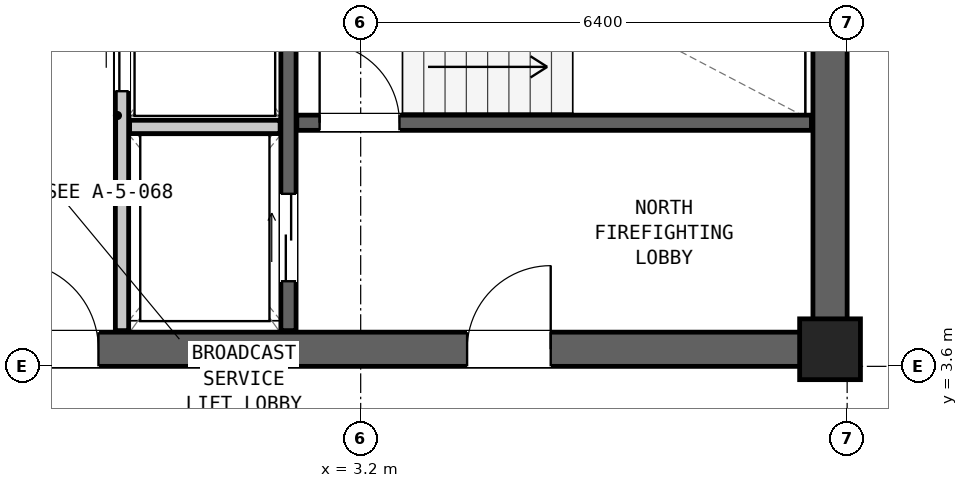
"""IFC4 building model, lengths in metres.
Left out: names, types, materials, properties, quantities, classifications, styles, units other than length and angle.
Written with IfcOpenShell. Run it as: python <this file> out.ifc"""

import sys

from ifc_helpers import new_model, si_unit, direction, frame, frame_2d, origin, origin_2d, place, context, subcontext, project, spatial, rectangle, extrude, element, fill, save


model = new_model("IFC4")
c1 = context("Model", 3, precision=1e-05, world=origin(), true_north=direction((0.0, 1.0)))
c2 = subcontext(c1, "Body", "Model", "MODEL_VIEW")
j1 = project(units=[si_unit("LENGTHUNIT", "METRE"), si_unit("PLANEANGLEUNIT", "RADIAN")], contexts=[c1])
p1 = place(None, origin())
s1 = spatial("IfcSite", under=j1, at=p1, CompositionType="ELEMENT")
p2 = place(p1, origin())
s2 = spatial("IfcBuilding", under=s1, at=p2, CompositionType="ELEMENT")
p3 = place(p2, frame((0.0, 0.0, 220.85)))
s3 = spatial("IfcBuildingStorey", under=s2, at=p3, CompositionType="ELEMENT", Elevation=220.85)
p4 = place(p3, frame((-9.6, 3.825, 0.0), z_axis=(0.0, 0.0, 1.0), x_axis=(1.0, 0.0, 0.0)))
e1 = element("IfcWall", 1, at=p4, inside=s3, PredefinedType="SHEAR", context=c2, shape_type="SweptSolid", body=[
    extrude(rectangle(XDim=19.2, YDim=0.45, at=frame_2d((9.6, 0.0))), origin(), (0.0, 0.0, 1.0), 3.05),
])
p5 = place(p4, frame((14.2, 0.0, 0.0)))
e2 = element("IfcOpeningElement", 2, at=p5, cuts=e1, PredefinedType="OPENING", context=c2, shape_type="SweptSolid", body=[
    extrude(rectangle(XDim=1.1, YDim=2.08, at=frame_2d((0.55, 1.04))), frame((0.0, 0.237, 0.0), z_axis=(0.0, -1.0, 0.0), x_axis=(1.0, 0.0, 0.0)), (0.0, 0.0, 1.0), 0.474),
])
p6 = place(p4, frame((8.2, 0.0, 0.0)))
e3 = element("IfcOpeningElement", 3, at=p6, cuts=e1, PredefinedType="OPENING", context=c2, shape_type="SweptSolid", body=[
    extrude(rectangle(XDim=1.15, YDim=2.1, at=frame_2d((0.575, 1.05))), frame((0.0, 0.237, 0.0), z_axis=(0.0, -1.0, 0.0), x_axis=(1.0, 0.0, 0.0)), (0.0, 0.0, 1.0), 0.474),
])
p7 = place(p4, frame((2.5, 0.0, 0.0)))
e4 = element("IfcOpeningElement", 4, at=p7, cuts=e1, PredefinedType="OPENING", context=c2, shape_type="SweptSolid", body=[
    extrude(rectangle(XDim=1.6, YDim=2.12, at=frame_2d((0.8, 1.06))), frame((0.0, 0.237, 0.0), z_axis=(0.0, -1.0, 0.0), x_axis=(1.0, 0.0, 0.0)), (0.0, 0.0, 1.0), 0.474),
])
p8 = place(p3, frame((9.375, 3.6, 0.0), z_axis=(0.0, 0.0, 1.0), x_axis=(0.0, 1.0, 0.0)))
e5 = element("IfcWall", 5, at=p8, inside=s3, PredefinedType="SHEAR", context=c2, shape_type="SweptSolid", body=[
    extrude(rectangle(XDim=6.6, YDim=0.45, at=frame_2d((3.3, 0.0))), origin(), (0.0, 0.0, 1.0), 3.05),
])
p9 = place(p3, frame((9.375, 3.825, 0.0), z_axis=(0.0, 0.0, 1.0), x_axis=(1.0, 0.0, 0.0)))
e6 = element("IfcColumn", 6, at=p9, inside=s3, PredefinedType="COLUMN", context=c2, shape_type="SweptSolid", body=[
    extrude(rectangle(XDim=0.8, YDim=0.8, at=origin_2d()), origin(), (0.0, 0.0, 1.0), 3.05),
])
p10 = place(p3, frame((2.36, 6.805, 0.0), z_axis=(0.0, 0.0, 1.0), x_axis=(1.0, 0.0, 0.0)))
e7 = element("IfcWall", 7, at=p10, inside=s3, PredefinedType="SHEAR", context=c2, shape_type="SweptSolid", body=[
    extrude(rectangle(XDim=6.77, YDim=0.2, at=frame_2d((3.385, 0.0))), origin(), (0.0, 0.0, 1.0), 2.86),
])
p11 = place(p10, frame((0.3, 0.0, 0.0)))
e8 = element("IfcOpeningElement", 8, at=p11, cuts=e7, PredefinedType="OPENING", context=c2, shape_type="SweptSolid", body=[
    extrude(rectangle(XDim=1.05, YDim=2.08, at=frame_2d((0.525, 1.04))), frame((0.0, 0.112, 0.0), z_axis=(0.0, -1.0, 0.0), x_axis=(1.0, 0.0, 0.0)), (0.0, 0.0, 1.0), 0.224),
])
p12 = place(p3, frame((2.25, 4.07, 0.0), z_axis=(0.0, 0.0, 1.0), x_axis=(0.0, 1.0, 0.0)))
e9 = element("IfcWall", 9, at=p12, inside=s3, PredefinedType="SHEAR", context=c2, shape_type="SweptSolid", body=[
    extrude(rectangle(XDim=5.66, YDim=0.2, at=frame_2d((2.83, 0.0))), origin(), (0.0, 0.0, 1.0), 2.86),
])
p13 = place(p12, frame((0.65, 0.0, 0.0)))
e10 = element("IfcOpeningElement", 10, at=p13, cuts=e9, PredefinedType="OPENING", context=c2, shape_type="SweptSolid", body=[
    extrude(rectangle(XDim=1.15, YDim=2.08, at=frame_2d((0.575, 1.04))), frame((0.0, 0.112, 0.0), z_axis=(0.0, -1.0, 0.0), x_axis=(1.0, 0.0, 0.0)), (0.0, 0.0, 1.0), 0.224),
])
p14 = place(p3, frame((0.06, 4.07, 0.0), z_axis=(0.0, 0.0, 1.0), x_axis=(0.0, 1.0, 0.0)))
e11 = element("IfcWall", 11, at=p14, inside=s3, PredefinedType="PARTITIONING", context=c2, shape_type="SweptSolid", body=[
    extrude(rectangle(XDim=5.66, YDim=0.175, at=frame_2d((2.83, 0.0))), origin(), (0.0, 0.0, 1.0), 2.86),
])
p15 = place(p14, frame((3.15, 0.0, 0.0)))
e12 = element("IfcOpeningElement", 12, at=p15, cuts=e11, PredefinedType="OPENING", context=c2, shape_type="SweptSolid", body=[
    extrude(rectangle(XDim=1.4, YDim=2.12, at=frame_2d((0.7, 1.06))), frame((0.0, 0.1, 0.0), z_axis=(0.0, -1.0, 0.0), x_axis=(1.0, 0.0, 0.0)), (0.0, 0.0, 1.0), 0.199),
])
p16 = place(p3, frame((0.16, 6.75, 0.0), z_axis=(0.0, 0.0, 1.0), x_axis=(1.0, 0.0, 0.0)))
e13 = element("IfcWall", 13, at=p16, inside=s3, PredefinedType="PARTITIONING", context=c2, shape_type="SweptSolid", body=[
    extrude(rectangle(XDim=1.98, YDim=0.175, at=frame_2d((0.99, 0.0))), origin(), (0.0, 0.0, 1.0), 2.86),
])
p17 = place(p11, origin())
e14 = element("IfcDoor", 14, at=p17, inside=s3, OperationType="SINGLE_SWING_LEFT", PredefinedType="DOOR", context=c2, shape_type="SweptSolid", body=[
    extrude(rectangle(XDim=1.05, YDim=2.08, at=frame_2d((0.525, 1.04))), frame((0.0, 0.025, 0.0), z_axis=(0.0, -1.0, 0.0), x_axis=(1.0, 0.0, 0.0)), (0.0, 0.0, 1.0), 0.05),
])
fill(e8, e14)
p18 = place(p5, origin())
e15 = element("IfcDoor", 15, at=p18, inside=s3, OperationType="SINGLE_SWING_RIGHT", PredefinedType="DOOR", context=c2, shape_type="SweptSolid", body=[
    extrude(rectangle(XDim=1.1, YDim=2.08, at=frame_2d((0.55, 1.04))), frame((0.0, 0.025, 0.0), z_axis=(0.0, -1.0, 0.0), x_axis=(1.0, 0.0, 0.0)), (0.0, 0.0, 1.0), 0.05),
])
fill(e2, e15)
p19 = place(p13, origin())
e16 = element("IfcDoor", 16, at=p19, inside=s3, OperationType="DOUBLE_DOOR_SLIDING", PredefinedType="DOOR", context=c2, shape_type="SweptSolid", body=[
    extrude(rectangle(XDim=1.15, YDim=2.08, at=frame_2d((0.575, 1.04))), frame((0.0, 0.025, 0.0), z_axis=(0.0, -1.0, 0.0), x_axis=(1.0, 0.0, 0.0)), (0.0, 0.0, 1.0), 0.05),
])
fill(e10, e16)
p20 = place(p15, origin())
e17 = element("IfcDoor", 17, at=p20, inside=s3, OperationType="DOUBLE_DOOR_SLIDING", PredefinedType="DOOR", context=c2, shape_type="SweptSolid", body=[
    extrude(rectangle(XDim=1.4, YDim=2.12, at=frame_2d((0.7, 1.06))), frame((0.0, 0.025, 0.0), z_axis=(0.0, -1.0, 0.0), x_axis=(1.0, 0.0, 0.0)), (0.0, 0.0, 1.0), 0.05),
])
fill(e12, e17)
p21 = place(p6, origin())
e18 = element("IfcDoor", 18, at=p21, inside=s3, OperationType="SINGLE_SWING_LEFT", PredefinedType="DOOR", context=c2, shape_type="SweptSolid", body=[
    extrude(rectangle(XDim=1.15, YDim=2.1, at=frame_2d((0.575, 1.05))), frame((0.0, 0.025, 0.0), z_axis=(0.0, -1.0, 0.0), x_axis=(1.0, 0.0, 0.0)), (0.0, 0.0, 1.0), 0.05),
])
fill(e3, e18)
save(model, sys.argv[1])
